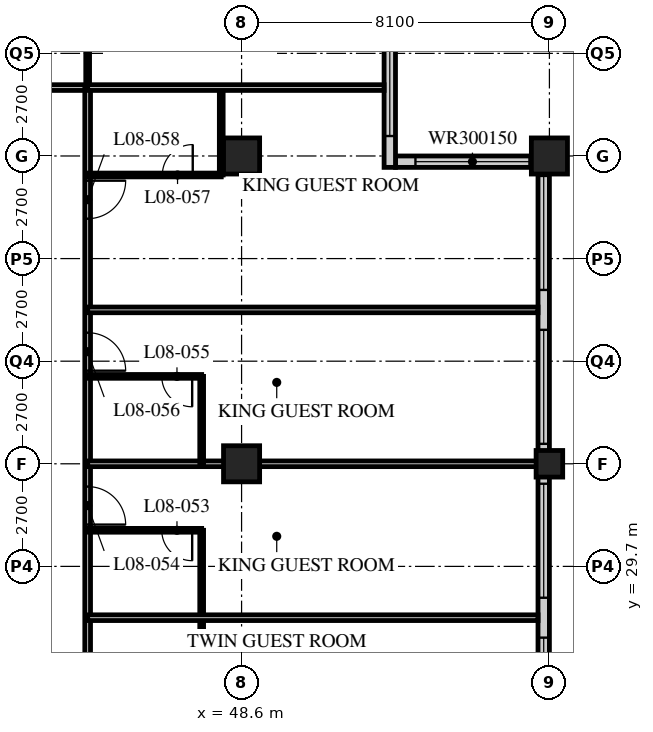
"""IFC4 building model, lengths in metres.
Left out: names, types, materials, properties, quantities, classifications, styles, units other than length and angle.
Written with IfcOpenShell. Run it as: python <this file> out.ifc"""

import sys

from ifc_helpers import new_model, si_unit, direction, frame, frame_2d, origin, origin_2d, place, context, subcontext, project, spatial, rectangle, hollow_rectangle, extrude, element, fill, save


model = new_model("IFC4")
c1 = context("Model", 3, precision=1e-05, world=origin(), true_north=direction((0.0, 1.0)))
c2 = subcontext(c1, "Body", "Model", "MODEL_VIEW")
j1 = project(units=[si_unit("LENGTHUNIT", "METRE"), si_unit("PLANEANGLEUNIT", "RADIAN")], contexts=[c1])
p1 = place(None, origin())
s1 = spatial("IfcSite", under=j1, at=p1, CompositionType="ELEMENT")
p2 = place(p1, origin())
s2 = spatial("IfcBuilding", under=s1, at=p2, CompositionType="ELEMENT")
p3 = place(p2, frame((0.0, 0.0, 39.8)))
s3 = spatial("IfcBuildingStorey", under=s2, at=p3, CompositionType="ELEMENT", Elevation=39.8)
for number, where, z_axis, x_axis in (
    (1, (48.6, 32.4, 0.0), (0.0, 0.0, 1.0), (1.0, 0.0, 0.0)),
    (2, (48.6, 40.5, 0.0), (0.0, 0.0, 1.0), (1.0, 0.0, 0.0)),
):
    element("IfcColumn", number, at=place(p3, frame(where, z_axis=z_axis, x_axis=x_axis)), inside=s3, PredefinedType="COLUMN", context=c2, shape_type="SweptSolid", body=[
        extrude(hollow_rectangle(XDim=0.95, YDim=0.95, WallThickness=0.095, at=origin_2d()), origin(), (0.0, 0.0, 1.0), 3.4),
    ])
p4 = place(p3, frame((56.7, 32.4, 0.0), z_axis=(0.0, 0.0, 1.0), x_axis=(1.0, 0.0, 0.0)))
e3 = element("IfcColumn", 3, at=p4, inside=s3, PredefinedType="COLUMN", context=c2, shape_type="SweptSolid", body=[
    extrude(hollow_rectangle(XDim=0.7, YDim=0.7, WallThickness=0.06, at=origin_2d()), origin(), (0.0, 0.0, 1.0), 3.4),
])
p5 = place(p3, frame((56.7, 40.5, 0.0), z_axis=(0.0, 0.0, 1.0), x_axis=(1.0, 0.0, 0.0)))
e4 = element("IfcColumn", 4, at=p5, inside=s3, PredefinedType="COLUMN", context=c2, shape_type="SweptSolid", body=[
    extrude(hollow_rectangle(XDim=0.95, YDim=0.95, WallThickness=0.095, at=origin_2d()), origin(), (0.0, 0.0, 1.0), 3.4),
])
p6 = place(p3, frame((56.55, 8.4, 0.0), z_axis=(0.0, 0.0, 1.0), x_axis=(0.0, 1.0, 0.0)))
e5 = element("IfcWall", 5, at=p6, inside=s3, PredefinedType="SOLIDWALL", context=c2, shape_type="SweptSolid", body=[
    extrude(rectangle(XDim=32.1, YDim=0.3, at=frame_2d((16.05, 0.0))), origin(), (0.0, 0.0, 1.0), 3.19),
])
p7 = place(p6, frame((0.225, 0.0, 0.9)))
e6 = element("IfcOpeningElement", 6, at=p7, cuts=e5, PredefinedType="OPENING", context=c2, shape_type="SweptSolid", body=[
    extrude(rectangle(XDim=3.0, YDim=2.0, at=frame_2d((1.5, 1.0))), frame((0.0, 0.16, 0.0), z_axis=(0.0, -1.0, 0.0), x_axis=(1.0, 0.0, 0.0)), (0.0, 0.0, 1.0), 0.32),
])
p8 = place(p6, frame((4.275, 0.0, 0.9)))
e7 = element("IfcOpeningElement", 7, at=p8, cuts=e5, PredefinedType="OPENING", context=c2, shape_type="SweptSolid", body=[
    extrude(rectangle(XDim=3.0, YDim=2.0, at=frame_2d((1.5, 1.0))), frame((0.0, 0.16, 0.0), z_axis=(0.0, -1.0, 0.0), x_axis=(1.0, 0.0, 0.0)), (0.0, 0.0, 1.0), 0.32),
])
p9 = place(p6, frame((8.325, 0.0, 0.9)))
e8 = element("IfcOpeningElement", 8, at=p9, cuts=e5, PredefinedType="OPENING", context=c2, shape_type="SweptSolid", body=[
    extrude(rectangle(XDim=3.0, YDim=2.0, at=frame_2d((1.5, 1.0))), frame((0.0, 0.16, 0.0), z_axis=(0.0, -1.0, 0.0), x_axis=(1.0, 0.0, 0.0)), (0.0, 0.0, 1.0), 0.32),
])
p10 = place(p6, frame((12.375, 0.0, 0.9)))
e9 = element("IfcOpeningElement", 9, at=p10, cuts=e5, PredefinedType="OPENING", context=c2, shape_type="SweptSolid", body=[
    extrude(rectangle(XDim=3.0, YDim=2.0, at=frame_2d((1.5, 1.0))), frame((0.0, 0.16, 0.0), z_axis=(0.0, -1.0, 0.0), x_axis=(1.0, 0.0, 0.0)), (0.0, 0.0, 1.0), 0.32),
])
p11 = place(p6, frame((16.425, 0.0, 0.9)))
e10 = element("IfcOpeningElement", 10, at=p11, cuts=e5, PredefinedType="OPENING", context=c2, shape_type="SweptSolid", body=[
    extrude(rectangle(XDim=3.0, YDim=2.0, at=frame_2d((1.5, 1.0))), frame((0.0, 0.16, 0.0), z_axis=(0.0, -1.0, 0.0), x_axis=(1.0, 0.0, 0.0)), (0.0, 0.0, 1.0), 0.32),
])
p12 = place(p6, frame((20.475, 0.0, 0.9)))
e11 = element("IfcOpeningElement", 11, at=p12, cuts=e5, PredefinedType="OPENING", context=c2, shape_type="SweptSolid", body=[
    extrude(rectangle(XDim=3.0, YDim=2.0, at=frame_2d((1.5, 1.0))), frame((0.0, 0.16, 0.0), z_axis=(0.0, -1.0, 0.0), x_axis=(1.0, 0.0, 0.0)), (0.0, 0.0, 1.0), 0.32),
])
p13 = place(p6, frame((24.525, 0.0, 0.9)))
e12 = element("IfcOpeningElement", 12, at=p13, cuts=e5, PredefinedType="OPENING", context=c2, shape_type="SweptSolid", body=[
    extrude(rectangle(XDim=3.0, YDim=2.0, at=frame_2d((1.5, 1.0))), frame((0.0, 0.16, 0.0), z_axis=(0.0, -1.0, 0.0), x_axis=(1.0, 0.0, 0.0)), (0.0, 0.0, 1.0), 0.32),
])
p14 = place(p6, frame((28.575, 0.0, 0.9)))
e13 = element("IfcOpeningElement", 13, at=p14, cuts=e5, PredefinedType="OPENING", context=c2, shape_type="SweptSolid", body=[
    extrude(rectangle(XDim=3.0, YDim=2.0, at=frame_2d((1.5, 1.0))), frame((0.0, 0.16, 0.0), z_axis=(0.0, -1.0, 0.0), x_axis=(1.0, 0.0, 0.0)), (0.0, 0.0, 1.0), 0.32),
])
p15 = place(p3, frame((56.4, 40.35, 0.0), z_axis=(0.0, 0.0, 1.0), x_axis=(-1.0, 0.0, 0.0)))
e14 = element("IfcWall", 14, at=p15, inside=s3, PredefinedType="SOLIDWALL", context=c2, shape_type="SweptSolid", body=[
    extrude(rectangle(XDim=3.75, YDim=0.3, at=frame_2d((1.875, 0.0))), origin(), (0.0, 0.0, 1.0), 3.19),
])
p16 = place(p15, frame((0.225, 0.0, 0.9)))
e15 = element("IfcOpeningElement", 15, at=p16, cuts=e14, PredefinedType="OPENING", context=c2, shape_type="SweptSolid", body=[
    extrude(rectangle(XDim=3.0, YDim=1.5, at=frame_2d((1.5, 0.75))), frame((0.0, 0.16, 0.0), z_axis=(0.0, -1.0, 0.0), x_axis=(1.0, 0.0, 0.0)), (0.0, 0.0, 1.0), 0.32),
])
p17 = place(p3, frame((52.5, 40.2, 0.0), z_axis=(0.0, 0.0, 1.0), x_axis=(0.0, 1.0, 0.0)))
e16 = element("IfcWall", 16, at=p17, inside=s3, PredefinedType="SOLIDWALL", context=c2, shape_type="SweptSolid", body=[
    extrude(rectangle(XDim=4.35, YDim=0.3, at=frame_2d((2.175, 0.0))), origin(), (0.0, 0.0, 1.0), 3.19),
])
p18 = place(p17, frame((0.825, 0.0, 0.9)))
e17 = element("IfcOpeningElement", 17, at=p18, cuts=e16, PredefinedType="OPENING", context=c2, shape_type="SweptSolid", body=[
    extrude(rectangle(XDim=3.0, YDim=1.5, at=frame_2d((1.5, 0.75))), frame((0.0, 0.16, 0.0), z_axis=(0.0, -1.0, 0.0), x_axis=(1.0, 0.0, 0.0)), (0.0, 0.0, 1.0), 0.32),
])
p19 = place(p3, frame((12.15, 42.3, 0.0), z_axis=(0.0, 0.0, 1.0), x_axis=(1.0, 0.0, 0.0)))
e18 = element("IfcWall", 18, at=p19, inside=s3, PredefinedType="PARTITIONING", context=c2, shape_type="SweptSolid", body=[
    extrude(rectangle(XDim=32.4, YDim=0.15, at=frame_2d((16.2, 0.0))), origin(), (0.0, 0.0, 1.0), 3.19),
])
p20 = place(p19, frame((6.5, 0.0, 0.0)))
e19 = element("IfcOpeningElement", 19, at=p20, cuts=e18, PredefinedType="OPENING", context=c2, shape_type="SweptSolid", body=[
    extrude(rectangle(XDim=1.0, YDim=2.1, at=frame_2d((0.5, 1.05))), frame((0.0, 0.085, 0.0), z_axis=(0.0, -1.0, 0.0), x_axis=(1.0, 0.0, 0.0)), (0.0, 0.0, 1.0), 0.17),
])
p21 = place(p19, frame((8.4, 0.0, 0.0)))
e20 = element("IfcOpeningElement", 20, at=p21, cuts=e18, PredefinedType="OPENING", context=c2, shape_type="SweptSolid", body=[
    extrude(rectangle(XDim=1.0, YDim=2.1, at=frame_2d((0.5, 1.05))), frame((0.0, 0.085, 0.0), z_axis=(0.0, -1.0, 0.0), x_axis=(1.0, 0.0, 0.0)), (0.0, 0.0, 1.0), 0.17),
])
p22 = place(p19, frame((14.6, 0.0, 0.0)))
e21 = element("IfcOpeningElement", 21, at=p22, cuts=e18, PredefinedType="OPENING", context=c2, shape_type="SweptSolid", body=[
    extrude(rectangle(XDim=1.0, YDim=2.1, at=frame_2d((0.5, 1.05))), frame((0.0, 0.085, 0.0), z_axis=(0.0, -1.0, 0.0), x_axis=(1.0, 0.0, 0.0)), (0.0, 0.0, 1.0), 0.17),
])
p23 = place(p19, frame((18.65, 0.0, 0.0)))
e22 = element("IfcOpeningElement", 22, at=p23, cuts=e18, PredefinedType="OPENING", context=c2, shape_type="SweptSolid", body=[
    extrude(rectangle(XDim=1.0, YDim=2.1, at=frame_2d((0.5, 1.05))), frame((0.0, 0.085, 0.0), z_axis=(0.0, -1.0, 0.0), x_axis=(1.0, 0.0, 0.0)), (0.0, 0.0, 1.0), 0.17),
])
p24 = place(p19, frame((23.0, 0.0, 0.0)))
e23 = element("IfcOpeningElement", 23, at=p24, cuts=e18, PredefinedType="OPENING", context=c2, shape_type="SweptSolid", body=[
    extrude(rectangle(XDim=1.0, YDim=2.1, at=frame_2d((0.5, 1.05))), frame((0.0, 0.085, 0.0), z_axis=(0.0, -1.0, 0.0), x_axis=(1.0, 0.0, 0.0)), (0.0, 0.0, 1.0), 0.17),
])
p25 = place(p19, frame((26.75, 0.0, 0.0)))
e24 = element("IfcOpeningElement", 24, at=p25, cuts=e18, PredefinedType="OPENING", context=c2, shape_type="SweptSolid", body=[
    extrude(rectangle(XDim=1.0, YDim=2.1, at=frame_2d((0.5, 1.05))), frame((0.0, 0.085, 0.0), z_axis=(0.0, -1.0, 0.0), x_axis=(1.0, 0.0, 0.0)), (0.0, 0.0, 1.0), 0.17),
])
p26 = place(p19, frame((28.775, 0.0, 0.0)))
e25 = element("IfcOpeningElement", 25, at=p26, cuts=e18, PredefinedType="OPENING", context=c2, shape_type="SweptSolid", body=[
    extrude(rectangle(XDim=1.0, YDim=2.1, at=frame_2d((0.5, 1.05))), frame((0.0, 0.085, 0.0), z_axis=(0.0, -1.0, 0.0), x_axis=(1.0, 0.0, 0.0)), (0.0, 0.0, 1.0), 0.17),
])
p27 = place(p19, frame((2.625, 0.0, 0.0)))
e26 = element("IfcOpeningElement", 26, at=p27, cuts=e18, PredefinedType="OPENING", context=c2, shape_type="SweptSolid", body=[
    extrude(rectangle(XDim=1.0, YDim=2.1, at=frame_2d((0.5, 1.05))), frame((0.0, 0.085, 0.0), z_axis=(0.0, -1.0, 0.0), x_axis=(1.0, 0.0, 0.0)), (0.0, 0.0, 1.0), 0.17),
])
p28 = place(p3, frame((44.55, 16.2, 0.0), z_axis=(0.0, 0.0, 1.0), x_axis=(0.0, 1.0, 0.0)))
e27 = element("IfcWall", 27, at=p28, inside=s3, PredefinedType="PARTITIONING", context=c2, shape_type="SweptSolid", body=[
    extrude(rectangle(XDim=26.1, YDim=0.15, at=frame_2d((13.05, 0.0))), origin(), (0.0, 0.0, 1.0), 3.19),
])
p29 = place(p28, frame((2.75, 0.0, 0.0)))
e28 = element("IfcOpeningElement", 28, at=p29, cuts=e27, PredefinedType="OPENING", context=c2, shape_type="SweptSolid", body=[
    extrude(rectangle(XDim=1.0, YDim=2.1, at=frame_2d((0.5, 1.05))), frame((0.0, 0.085, 0.0), z_axis=(0.0, -1.0, 0.0), x_axis=(1.0, 0.0, 0.0)), (0.0, 0.0, 1.0), 0.17),
])
p30 = place(p28, frame((4.35, 0.0, 0.0)))
e29 = element("IfcOpeningElement", 29, at=p30, cuts=e27, PredefinedType="OPENING", context=c2, shape_type="SweptSolid", body=[
    extrude(rectangle(XDim=1.0, YDim=2.1, at=frame_2d((0.5, 1.05))), frame((0.0, 0.085, 0.0), z_axis=(0.0, -1.0, 0.0), x_axis=(1.0, 0.0, 0.0)), (0.0, 0.0, 1.0), 0.17),
])
p31 = place(p28, frame((8.4, 0.0, 0.0)))
e30 = element("IfcOpeningElement", 30, at=p31, cuts=e27, PredefinedType="OPENING", context=c2, shape_type="SweptSolid", body=[
    extrude(rectangle(XDim=1.0, YDim=2.1, at=frame_2d((0.5, 1.05))), frame((0.0, 0.085, 0.0), z_axis=(0.0, -1.0, 0.0), x_axis=(1.0, 0.0, 0.0)), (0.0, 0.0, 1.0), 0.17),
])
p32 = place(p28, frame((14.6, 0.0, 0.0)))
e31 = element("IfcOpeningElement", 31, at=p32, cuts=e27, PredefinedType="OPENING", context=c2, shape_type="SweptSolid", body=[
    extrude(rectangle(XDim=1.0, YDim=2.1, at=frame_2d((0.5, 1.05))), frame((0.0, 0.085, 0.0), z_axis=(0.0, -1.0, 0.0), x_axis=(1.0, 0.0, 0.0)), (0.0, 0.0, 1.0), 0.17),
])
p33 = place(p28, frame((18.65, 0.0, 0.0)))
e32 = element("IfcOpeningElement", 32, at=p33, cuts=e27, PredefinedType="OPENING", context=c2, shape_type="SweptSolid", body=[
    extrude(rectangle(XDim=1.0, YDim=2.1, at=frame_2d((0.5, 1.05))), frame((0.0, 0.085, 0.0), z_axis=(0.0, -1.0, 0.0), x_axis=(1.0, 0.0, 0.0)), (0.0, 0.0, 1.0), 0.17),
])
p34 = place(p28, frame((22.65, 0.0, 0.0)))
e33 = element("IfcOpeningElement", 33, at=p34, cuts=e27, PredefinedType="OPENING", context=c2, shape_type="SweptSolid", body=[
    extrude(rectangle(XDim=1.0, YDim=2.1, at=frame_2d((0.5, 1.05))), frame((0.0, 0.085, 0.0), z_axis=(0.0, -1.0, 0.0), x_axis=(1.0, 0.0, 0.0)), (0.0, 0.0, 1.0), 0.17),
])
p35 = place(p3, frame((47.55, 25.75, 0.0), z_axis=(0.0, 0.0, 1.0), x_axis=(0.0, 1.0, 0.0)))
e34 = element("IfcWall", 34, at=p35, inside=s3, PredefinedType="PARTITIONING", context=c2, shape_type="SweptSolid", body=[
    extrude(rectangle(XDim=4.9, YDim=0.1, at=frame_2d((2.45, 0.0))), origin(), (0.0, 0.0, 1.0), 3.19),
])
p36 = place(p3, frame((44.55, 28.35, 0.0), z_axis=(0.0, 0.0, 1.0), x_axis=(1.0, 0.0, 0.0)))
e35 = element("IfcWall", 35, at=p36, inside=s3, PredefinedType="PARTITIONING", context=c2, shape_type="SweptSolid", body=[
    extrude(rectangle(XDim=11.85, YDim=0.15, at=frame_2d((5.925, 0.0))), origin(), (0.0, 0.0, 1.0), 3.19),
])
p37 = place(p3, frame((44.55, 30.65, 0.0), z_axis=(0.0, 0.0, 1.0), x_axis=(1.0, 0.0, 0.0)))
e36 = element("IfcWall", 36, at=p37, inside=s3, PredefinedType="PARTITIONING", context=c2, shape_type="SweptSolid", body=[
    extrude(rectangle(XDim=3.0, YDim=0.1, at=frame_2d((1.5, 0.0))), origin(), (0.0, 0.0, 1.0), 3.19),
])
p38 = place(p37, frame((1.95, 0.0, 0.0)))
e37 = element("IfcOpeningElement", 37, at=p38, cuts=e36, PredefinedType="OPENING", context=c2, shape_type="SweptSolid", body=[
    extrude(rectangle(XDim=0.8, YDim=2.1, at=frame_2d((0.4, 1.05))), frame((0.0, 0.06, 0.0), z_axis=(0.0, -1.0, 0.0), x_axis=(1.0, 0.0, 0.0)), (0.0, 0.0, 1.0), 0.12),
])
p39 = place(p3, frame((44.55, 32.4, 0.0), z_axis=(0.0, 0.0, 1.0), x_axis=(1.0, 0.0, 0.0)))
e38 = element("IfcWall", 38, at=p39, inside=s3, PredefinedType="PARTITIONING", context=c2, shape_type="SweptSolid", body=[
    extrude(rectangle(XDim=11.85, YDim=0.15, at=frame_2d((5.925, 0.0))), origin(), (0.0, 0.0, 1.0), 2.578),
])
p40 = place(p3, frame((47.55, 32.4, 0.0), z_axis=(0.0, 0.0, 1.0), x_axis=(0.0, 1.0, 0.0)))
e39 = element("IfcWall", 39, at=p40, inside=s3, PredefinedType="PARTITIONING", context=c2, shape_type="SweptSolid", body=[
    extrude(rectangle(XDim=2.3, YDim=0.1, at=frame_2d((1.15, 0.0))), origin(), (0.0, 0.0, 1.0), 3.19),
])
p41 = place(p3, frame((44.55, 34.7, 0.0), z_axis=(0.0, 0.0, 1.0), x_axis=(1.0, 0.0, 0.0)))
e40 = element("IfcWall", 40, at=p41, inside=s3, PredefinedType="PARTITIONING", context=c2, shape_type="SweptSolid", body=[
    extrude(rectangle(XDim=3.0, YDim=0.1, at=frame_2d((1.5, 0.0))), origin(), (0.0, 0.0, 1.0), 3.19),
])
p42 = place(p41, frame((1.95, 0.0, 0.0)))
e41 = element("IfcOpeningElement", 41, at=p42, cuts=e40, PredefinedType="OPENING", context=c2, shape_type="SweptSolid", body=[
    extrude(rectangle(XDim=0.8, YDim=2.1, at=frame_2d((0.4, 1.05))), frame((0.0, 0.06, 0.0), z_axis=(0.0, -1.0, 0.0), x_axis=(1.0, 0.0, 0.0)), (0.0, 0.0, 1.0), 0.12),
])
p43 = place(p3, frame((44.55, 36.45, 0.0), z_axis=(0.0, 0.0, 1.0), x_axis=(1.0, 0.0, 0.0)))
e42 = element("IfcWall", 42, at=p43, inside=s3, PredefinedType="PARTITIONING", context=c2, shape_type="SweptSolid", body=[
    extrude(rectangle(XDim=11.85, YDim=0.15, at=frame_2d((5.925, 0.0))), origin(), (0.0, 0.0, 1.0), 3.19),
])
p44 = place(p3, frame((48.065, 40.0, 0.0), z_axis=(0.0, 0.0, 1.0), x_axis=(0.0, 1.0, 0.0)))
e43 = element("IfcWall", 43, at=p44, inside=s3, PredefinedType="PARTITIONING", context=c2, shape_type="SweptSolid", body=[
    extrude(rectangle(XDim=2.3, YDim=0.1, at=frame_2d((1.15, 0.0))), origin(), (0.0, 0.0, 1.0), 3.19),
])
p45 = place(p3, frame((44.55, 40.0, 0.0), z_axis=(0.0, 0.0, 1.0), x_axis=(1.0, 0.0, 0.0)))
e44 = element("IfcWall", 44, at=p45, inside=s3, PredefinedType="PARTITIONING", context=c2, shape_type="SweptSolid", body=[
    extrude(rectangle(XDim=3.515, YDim=0.1, at=frame_2d((1.757, 0.0))), origin(), (0.0, 0.0, 1.0), 3.19),
])
p46 = place(p45, frame((1.965, 0.0, 0.0)))
e45 = element("IfcOpeningElement", 45, at=p46, cuts=e44, PredefinedType="OPENING", context=c2, shape_type="SweptSolid", body=[
    extrude(rectangle(XDim=0.8, YDim=2.1, at=frame_2d((0.4, 1.05))), frame((0.0, 0.06, 0.0), z_axis=(0.0, -1.0, 0.0), x_axis=(1.0, 0.0, 0.0)), (0.0, 0.0, 1.0), 0.12),
])
p47 = place(p3, frame((44.55, 42.3, 0.0), z_axis=(0.0, 0.0, 1.0), x_axis=(0.0, 1.0, 0.0)))
e46 = element("IfcWall", 46, at=p47, inside=s3, PredefinedType="PARTITIONING", context=c2, shape_type="SweptSolid", body=[
    extrude(rectangle(XDim=2.4, YDim=0.1, at=frame_2d((1.2, 0.0))), origin(), (0.0, 0.0, 1.0), 3.19),
])
p48 = place(p3, frame((44.55, 42.3, 0.0), z_axis=(0.0, 0.0, 1.0), x_axis=(1.0, 0.0, 0.0)))
e47 = element("IfcWall", 47, at=p48, inside=s3, PredefinedType="PARTITIONING", context=c2, shape_type="SweptSolid", body=[
    extrude(rectangle(XDim=7.8, YDim=0.15, at=frame_2d((3.9, 0.0))), origin(), (0.0, 0.0, 1.0), 3.19),
])
p49 = place(p11, origin())
e48 = element("IfcWindow", 48, at=p49, inside=s3, PartitioningType="SINGLE_PANEL", PredefinedType="WINDOW", context=c2, shape_type="SweptSolid", body=[
    extrude(rectangle(XDim=3.0, YDim=2.0, at=frame_2d((1.5, 1.0))), frame((0.0, 0.03, 0.0), z_axis=(0.0, -1.0, 0.0), x_axis=(1.0, 0.0, 0.0)), (0.0, 0.0, 1.0), 0.06),
])
fill(e10, e48)
p50 = place(p12, origin())
e49 = element("IfcWindow", 49, at=p50, inside=s3, PartitioningType="SINGLE_PANEL", PredefinedType="WINDOW", context=c2, shape_type="SweptSolid", body=[
    extrude(rectangle(XDim=3.0, YDim=2.0, at=frame_2d((1.5, 1.0))), frame((0.0, 0.03, 0.0), z_axis=(0.0, -1.0, 0.0), x_axis=(1.0, 0.0, 0.0)), (0.0, 0.0, 1.0), 0.06),
])
fill(e11, e49)
p51 = place(p13, origin())
e50 = element("IfcWindow", 50, at=p51, inside=s3, PartitioningType="SINGLE_PANEL", PredefinedType="WINDOW", context=c2, shape_type="SweptSolid", body=[
    extrude(rectangle(XDim=3.0, YDim=2.0, at=frame_2d((1.5, 1.0))), frame((0.0, 0.03, 0.0), z_axis=(0.0, -1.0, 0.0), x_axis=(1.0, 0.0, 0.0)), (0.0, 0.0, 1.0), 0.06),
])
fill(e12, e50)
p52 = place(p14, origin())
e51 = element("IfcWindow", 51, at=p52, inside=s3, PartitioningType="SINGLE_PANEL", PredefinedType="WINDOW", context=c2, shape_type="SweptSolid", body=[
    extrude(rectangle(XDim=3.0, YDim=2.0, at=frame_2d((1.5, 1.0))), frame((0.0, 0.03, 0.0), z_axis=(0.0, -1.0, 0.0), x_axis=(1.0, 0.0, 0.0)), (0.0, 0.0, 1.0), 0.06),
])
fill(e13, e51)
p53 = place(p16, origin())
e52 = element("IfcWindow", 52, at=p53, inside=s3, PartitioningType="SINGLE_PANEL", PredefinedType="WINDOW", context=c2, shape_type="SweptSolid", body=[
    extrude(rectangle(XDim=3.0, YDim=1.5, at=frame_2d((1.5, 0.75))), frame((0.0, 0.03, 0.0), z_axis=(0.0, -1.0, 0.0), x_axis=(1.0, 0.0, 0.0)), (0.0, 0.0, 1.0), 0.06),
])
fill(e15, e52)
p54 = place(p18, origin())
e53 = element("IfcWindow", 53, at=p54, inside=s3, PartitioningType="SINGLE_PANEL", PredefinedType="WINDOW", context=c2, shape_type="SweptSolid", body=[
    extrude(rectangle(XDim=3.0, YDim=1.5, at=frame_2d((1.5, 0.75))), frame((0.0, 0.03, 0.0), z_axis=(0.0, -1.0, 0.0), x_axis=(1.0, 0.0, 0.0)), (0.0, 0.0, 1.0), 0.06),
])
fill(e17, e53)
p55 = place(p38, origin())
e54 = element("IfcDoor", 54, at=p55, inside=s3, OperationType="SINGLE_SWING_LEFT", PredefinedType="DOOR", context=c2, shape_type="SweptSolid", body=[
    extrude(rectangle(XDim=0.8, YDim=2.1, at=frame_2d((0.4, 1.05))), frame((0.0, 0.025, 0.0), z_axis=(0.0, -1.0, 0.0), x_axis=(1.0, 0.0, 0.0)), (0.0, 0.0, 1.0), 0.05),
])
fill(e37, e54)
p56 = place(p32, origin())
e55 = element("IfcDoor", 55, at=p56, inside=s3, OperationType="SINGLE_SWING_RIGHT", PredefinedType="DOOR", context=c2, shape_type="SweptSolid", body=[
    extrude(rectangle(XDim=1.0, YDim=2.1, at=frame_2d((0.5, 1.05))), frame((0.0, 0.025, 0.0), z_axis=(0.0, -1.0, 0.0), x_axis=(1.0, 0.0, 0.0)), (0.0, 0.0, 1.0), 0.05),
])
fill(e31, e55)
p57 = place(p42, origin())
e56 = element("IfcDoor", 56, at=p57, inside=s3, OperationType="SINGLE_SWING_LEFT", PredefinedType="DOOR", context=c2, shape_type="SweptSolid", body=[
    extrude(rectangle(XDim=0.8, YDim=2.1, at=frame_2d((0.4, 1.05))), frame((0.0, 0.025, 0.0), z_axis=(0.0, -1.0, 0.0), x_axis=(1.0, 0.0, 0.0)), (0.0, 0.0, 1.0), 0.05),
])
fill(e41, e56)
p58 = place(p33, origin())
e57 = element("IfcDoor", 57, at=p58, inside=s3, OperationType="SINGLE_SWING_RIGHT", PredefinedType="DOOR", context=c2, shape_type="SweptSolid", body=[
    extrude(rectangle(XDim=1.0, YDim=2.1, at=frame_2d((0.5, 1.05))), frame((0.0, 0.025, 0.0), z_axis=(0.0, -1.0, 0.0), x_axis=(1.0, 0.0, 0.0)), (0.0, 0.0, 1.0), 0.05),
])
fill(e32, e57)
p59 = place(p46, origin())
e58 = element("IfcDoor", 58, at=p59, inside=s3, OperationType="SINGLE_SWING_RIGHT", PredefinedType="DOOR", context=c2, shape_type="SweptSolid", body=[
    extrude(rectangle(XDim=0.8, YDim=2.1, at=frame_2d((0.4, 1.05))), frame((0.0, 0.025, 0.0), z_axis=(0.0, -1.0, 0.0), x_axis=(1.0, 0.0, 0.0)), (0.0, 0.0, 1.0), 0.05),
])
fill(e45, e58)
p60 = place(p34, origin())
e59 = element("IfcDoor", 59, at=p60, inside=s3, OperationType="SINGLE_SWING_LEFT", PredefinedType="DOOR", context=c2, shape_type="SweptSolid", body=[
    extrude(rectangle(XDim=1.0, YDim=2.1, at=frame_2d((0.5, 1.05))), frame((0.0, 0.025, 0.0), z_axis=(0.0, -1.0, 0.0), x_axis=(1.0, 0.0, 0.0)), (0.0, 0.0, 1.0), 0.05),
])
fill(e33, e59)
save(model, sys.argv[1])
